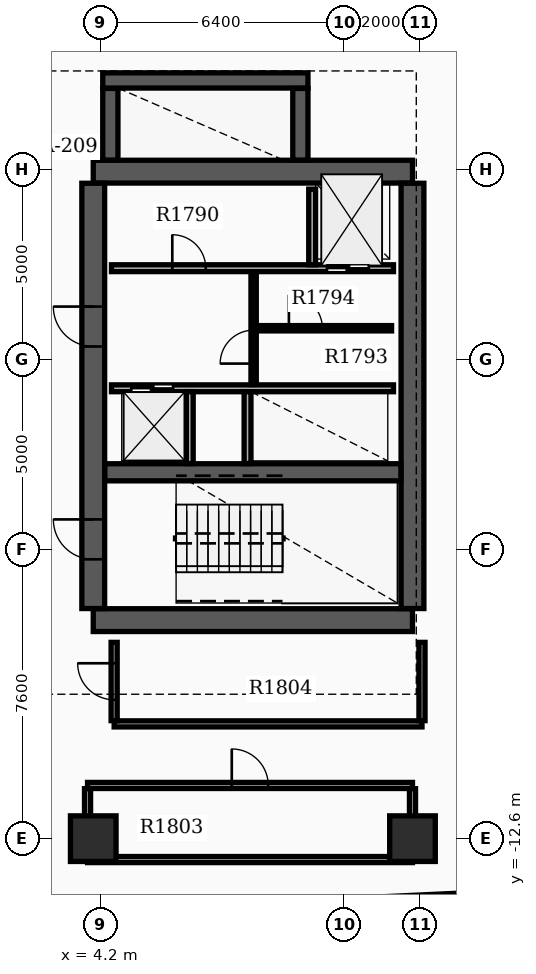
"""IFC4 building model, lengths in metres.
Left out: names, types, materials, properties, quantities, classifications, styles, units other than length and angle.
Written with IfcOpenShell. Run it as: python <this file> out.ifc"""

import sys

from ifc_helpers import new_model, si_unit, direction, frame, frame_2d, origin, origin_2d, place, context, subcontext, project, spatial, rectangle, extrude, element, fill, save


model = new_model("IFC4")
c1 = context("Model", 3, precision=1e-05, world=origin(), true_north=direction((0.0, 1.0)))
c2 = subcontext(c1, "Body", "Model", "MODEL_VIEW")
j1 = project(units=[si_unit("LENGTHUNIT", "METRE"), si_unit("PLANEANGLEUNIT", "RADIAN")], contexts=[c1])
p1 = place(None, origin())
s1 = spatial("IfcSite", under=j1, at=p1, CompositionType="ELEMENT")
p2 = place(p1, origin())
s2 = spatial("IfcBuilding", under=s1, at=p2, CompositionType="ELEMENT")
p3 = place(p2, frame((0.0, 0.0, 116.4)))
s3 = spatial("IfcBuildingStorey", under=s2, at=p3, CompositionType="ELEMENT", Elevation=116.4)
for number, where, z_axis, x_axis in (
    (1, (4.0, -6.85, 0.0), (0.0, 0.0, 1.0), (1.0, 0.0, 0.0)),
    (2, (4.0, 4.95, 0.0), (0.0, 0.0, 1.0), (1.0, 0.0, 0.0)),
):
    element("IfcWall", number, at=place(p3, frame(where, z_axis=z_axis, x_axis=x_axis)), inside=s3, PredefinedType="SHEAR", context=c2, shape_type="SweptSolid", body=[
        extrude(rectangle(XDim=8.4, YDim=0.6, at=frame_2d((4.2, 0.0))), origin(), (0.0, 0.0, 1.0), 3.7),
    ])
p4 = place(p3, frame((4.0, -6.545, 0.0), z_axis=(0.0, 0.0, 1.0), x_axis=(0.0, 1.0, 0.0)))
e3 = element("IfcWall", 3, at=p4, inside=s3, PredefinedType="SHEAR", context=c2, shape_type="SweptSolid", body=[
    extrude(rectangle(XDim=11.19, YDim=0.6, at=frame_2d((5.595, 0.0))), origin(), (0.0, 0.0, 1.0), 3.7),
])
p5 = place(p4, frame((1.295, 0.0, 0.0)))
e4 = element("IfcOpeningElement", 4, at=p5, cuts=e3, PredefinedType="OPENING", context=c2, shape_type="SweptSolid", body=[
    extrude(rectangle(XDim=1.05, YDim=2.15, at=frame_2d((0.525, 1.075))), frame((0.0, 0.31, 0.0), z_axis=(0.0, -1.0, 0.0), x_axis=(1.0, 0.0, 0.0)), (0.0, 0.0, 1.0), 0.62),
])
p6 = place(p4, frame((6.895, 0.0, 0.0)))
e5 = element("IfcOpeningElement", 5, at=p6, cuts=e3, PredefinedType="OPENING", context=c2, shape_type="SweptSolid", body=[
    extrude(rectangle(XDim=1.05, YDim=2.15, at=frame_2d((0.525, 1.075))), frame((0.0, 0.31, 0.0), z_axis=(0.0, -1.0, 0.0), x_axis=(1.0, 0.0, 0.0)), (0.0, 0.0, 1.0), 0.62),
])
p7 = place(p3, frame((12.4, -6.545, 0.0), z_axis=(0.0, 0.0, 1.0), x_axis=(0.0, 1.0, 0.0)))
e6 = element("IfcWall", 6, at=p7, inside=s3, PredefinedType="SHEAR", context=c2, shape_type="SweptSolid", body=[
    extrude(rectangle(XDim=11.19, YDim=0.6, at=frame_2d((5.595, 0.0))), origin(), (0.0, 0.0, 1.0), 3.7),
])
p8 = place(p3, frame((4.305, -2.96, 0.0), z_axis=(0.0, 0.0, 1.0), x_axis=(1.0, 0.0, 0.0)))
e7 = element("IfcWall", 7, at=p8, inside=s3, PredefinedType="SHEAR", context=c2, shape_type="SweptSolid", body=[
    extrude(rectangle(XDim=7.79, YDim=0.45, at=frame_2d((3.895, 0.0))), origin(), (0.0, 0.0, 1.0), 3.7),
])
p9 = place(p3, frame((4.45, 5.255, 0.0), z_axis=(0.0, 0.0, 1.0), x_axis=(0.0, 1.0, 0.0)))
e8 = element("IfcWall", 8, at=p9, inside=s3, PredefinedType="SHEAR", context=c2, shape_type="SweptSolid", body=[
    extrude(rectangle(XDim=1.885, YDim=0.4, at=frame_2d((0.942, 0.0))), origin(), (0.0, 0.0, 1.0), 3.7),
])
p10 = place(p3, frame((4.25, 7.35, 0.0), z_axis=(0.0, 0.0, 1.0), x_axis=(1.0, 0.0, 0.0)))
e9 = element("IfcWall", 9, at=p10, inside=s3, PredefinedType="SHEAR", context=c2, shape_type="SweptSolid", body=[
    extrude(rectangle(XDim=5.4, YDim=0.4, at=frame_2d((2.7, 0.0))), origin(), (0.0, 0.0, 1.0), 3.7),
])
p11 = place(p3, frame((9.45, 5.255, 0.0), z_axis=(0.0, 0.0, 1.0), x_axis=(0.0, 1.0, 0.0)))
e10 = element("IfcWall", 10, at=p11, inside=s3, PredefinedType="SHEAR", context=c2, shape_type="SweptSolid", body=[
    extrude(rectangle(XDim=1.885, YDim=0.4, at=frame_2d((0.942, 0.0))), origin(), (0.0, 0.0, 1.0), 3.7),
])
for number, where, z_axis, x_axis in (
    (11, (12.4, -12.6, 0.0), (0.0, 0.0, 1.0), (1.0, 0.0, 0.0)),
    (12, (4.0, -12.6, 0.0), (0.0, 0.0, 1.0), (1.0, 0.0, 0.0)),
):
    element("IfcColumn", number, at=place(p3, frame(where, z_axis=z_axis, x_axis=x_axis)), inside=s3, PredefinedType="COLUMN", context=c2, shape_type="SweptSolid", body=[
        extrude(rectangle(XDim=1.2, YDim=1.2, at=origin_2d()), origin(), (0.0, 0.0, 1.0), 3.9),
    ])
p12 = place(p3, frame((13.843, -14.164, 0.0), z_axis=(0.0, 0.0, 1.0), x_axis=(-0.998889082162, -0.047123258997, 0.0)))
e13 = element("IfcWall", 13, at=p12, inside=s3, PredefinedType="STANDARD", context=c2, shape_type="SweptSolid", body=[
    extrude(rectangle(XDim=6.3, YDim=0.28, at=frame_2d((3.15, 0.0))), origin(), (0.0, 0.0, 1.0), 2.97),
])
p13 = place(p3, frame((4.48, 2.41, 0.0), z_axis=(0.0, 0.0, 1.0), x_axis=(1.0, 0.0, 0.0)))
e14 = element("IfcWall", 14, at=p13, inside=s3, PredefinedType="SOLIDWALL", context=c2, shape_type="SweptSolid", body=[
    extrude(rectangle(XDim=7.42, YDim=0.18, at=frame_2d((3.71, 0.0))), origin(), (0.0, 0.0, 1.0), 2.96),
])
p14 = place(p13, frame((5.67, 0.0, 0.0)))
e15 = element("IfcOpeningElement", 15, at=p14, cuts=e14, PredefinedType="OPENING", context=c2, shape_type="SweptSolid", body=[
    extrude(rectangle(XDim=1.1, YDim=2.15, at=frame_2d((0.55, 1.075))), frame((0.0, 0.1, 0.0), z_axis=(0.0, -1.0, 0.0), x_axis=(1.0, 0.0, 0.0)), (0.0, 0.0, 1.0), 0.2),
])
p15 = place(p13, frame((1.6, 0.0, 0.0)))
e16 = element("IfcOpeningElement", 16, at=p15, cuts=e14, PredefinedType="OPENING", context=c2, shape_type="SweptSolid", body=[
    extrude(rectangle(XDim=0.88, YDim=2.1, at=frame_2d((0.44, 1.05))), frame((0.0, 0.1, 0.0), z_axis=(0.0, -1.0, 0.0), x_axis=(1.0, 0.0, 0.0)), (0.0, 0.0, 1.0), 0.2),
])
p16 = place(p3, frame((4.48, -0.75, 0.0), z_axis=(0.0, 0.0, 1.0), x_axis=(1.0, 0.0, 0.0)))
e17 = element("IfcWall", 17, at=p16, inside=s3, PredefinedType="SOLIDWALL", context=c2, shape_type="SweptSolid", body=[
    extrude(rectangle(XDim=7.42, YDim=0.18, at=frame_2d((3.71, 0.0))), origin(), (0.0, 0.0, 1.0), 2.96),
])
p17 = place(p16, frame((0.52, 0.0, 0.0)))
e18 = element("IfcOpeningElement", 18, at=p17, cuts=e17, PredefinedType="OPENING", context=c2, shape_type="SweptSolid", body=[
    extrude(rectangle(XDim=1.1, YDim=2.15, at=frame_2d((0.55, 1.075))), frame((0.0, 0.1, 0.0), z_axis=(0.0, -1.0, 0.0), x_axis=(1.0, 0.0, 0.0)), (0.0, 0.0, 1.0), 0.2),
])
p18 = place(p3, frame((9.76, 2.5, 0.0), z_axis=(0.0, 0.0, 1.0), x_axis=(0.0, 1.0, 0.0)))
e19 = element("IfcWall", 19, at=p18, inside=s3, PredefinedType="SOLIDWALL", context=c2, shape_type="SweptSolid", body=[
    extrude(rectangle(XDim=1.99, YDim=0.18, at=frame_2d((0.995, 0.0))), origin(), (0.0, 0.0, 1.0), 2.96),
])
for number, where, z_axis, x_axis in (
    (20, (6.54, -2.73, 0.0), (0.0, 0.0, 1.0), (0.0, 1.0, 0.0)),
    (21, (8.06, -2.73, 0.0), (0.0, 0.0, 1.0), (0.0, 1.0, 0.0)),
):
    element("IfcWall", number, at=place(p3, frame(where, z_axis=z_axis, x_axis=x_axis)), inside=s3, PredefinedType="SOLIDWALL", context=c2, shape_type="SweptSolid", body=[
        extrude(rectangle(XDim=1.89, YDim=0.18, at=frame_2d((0.945, 0.0))), origin(), (0.0, 0.0, 1.0), 2.96),
    ])
p19 = place(p3, frame((8.22, -0.65, 0.0), z_axis=(0.0, 0.0, 1.0), x_axis=(0.0, 1.0, 0.0)))
e22 = element("IfcWall", 22, at=p19, inside=s3, PredefinedType="SOLIDWALL", context=c2, shape_type="SweptSolid", body=[
    extrude(rectangle(XDim=2.96, YDim=0.14, at=frame_2d((1.48, 0.0))), origin(), (0.0, 0.0, 1.0), 2.96),
])
p20 = place(p19, frame((0.55, 0.0, 0.0)))
e23 = element("IfcOpeningElement", 23, at=p20, cuts=e22, PredefinedType="OPENING", context=c2, shape_type="SweptSolid", body=[
    extrude(rectangle(XDim=0.88, YDim=2.1, at=frame_2d((0.44, 1.05))), frame((0.0, 0.08, 0.0), z_axis=(0.0, -1.0, 0.0), x_axis=(1.0, 0.0, 0.0)), (0.0, 0.0, 1.0), 0.16),
])
p21 = place(p3, frame((8.298, 0.83, 0.0), z_axis=(0.0, 0.0, 1.0), x_axis=(1.0, 0.0, 0.0)))
e24 = element("IfcWall", 24, at=p21, inside=s3, PredefinedType="PARTITIONING", context=c2, shape_type="SweptSolid", body=[
    extrude(rectangle(XDim=3.552, YDim=0.14, at=frame_2d((1.776, 0.0))), origin(), (0.0, 0.0, 1.0), 2.96),
])
p22 = place(p21, frame((0.85, 0.0, 0.0)))
e25 = element("IfcOpeningElement", 25, at=p22, cuts=e24, PredefinedType="OPENING", context=c2, shape_type="SweptSolid", body=[
    extrude(rectangle(XDim=0.88, YDim=2.1, at=frame_2d((0.44, 1.05))), frame((0.0, 0.08, 0.0), z_axis=(0.0, -1.0, 0.0), x_axis=(1.0, 0.0, 0.0)), (0.0, 0.0, 1.0), 0.16),
])
p23 = place(p3, frame((3.85, -13.15, 0.0), z_axis=(0.0, 0.0, 1.0), x_axis=(1.0, 0.0, 0.0)))
e26 = element("IfcWall", 26, at=p23, inside=s3, PredefinedType="PARTITIONING", context=c2, shape_type="SweptSolid", body=[
    extrude(rectangle(XDim=8.55, YDim=0.16, at=frame_2d((4.275, 0.0))), origin(), (0.0, 0.0, 1.0), 2.96),
])
p24 = place(p3, frame((3.85, -11.2, 0.0), z_axis=(0.0, 0.0, 1.0), x_axis=(1.0, 0.0, 0.0)))
e27 = element("IfcWall", 27, at=p24, inside=s3, PredefinedType="PARTITIONING", context=c2, shape_type="SweptSolid", body=[
    extrude(rectangle(XDim=8.55, YDim=0.16, at=frame_2d((4.275, 0.0))), origin(), (0.0, 0.0, 1.0), 2.96),
])
p25 = place(p24, frame((3.795, 0.0, 0.0)))
e28 = element("IfcOpeningElement", 28, at=p25, cuts=e27, PredefinedType="OPENING", context=c2, shape_type="SweptSolid", body=[
    extrude(rectangle(XDim=0.96, YDim=2.15, at=frame_2d((0.48, 1.075))), frame((0.0, 0.09, 0.0), z_axis=(0.0, -1.0, 0.0), x_axis=(1.0, 0.0, 0.0)), (0.0, 0.0, 1.0), 0.18),
])
for number, where, z_axis, x_axis in (
    (29, (3.85, -13.065, 0.0), (0.0, 0.0, 1.0), (0.0, 1.0, 0.0)),
    (30, (12.4, -13.065, 0.0), (0.0, 0.0, 1.0), (0.0, 1.0, 0.0)),
):
    element("IfcWall", number, at=place(p3, frame(where, z_axis=z_axis, x_axis=x_axis)), inside=s3, PredefinedType="PARTITIONING", context=c2, shape_type="SweptSolid", body=[
        extrude(rectangle(XDim=1.78, YDim=0.16, at=frame_2d((0.89, 0.0))), origin(), (0.0, 0.0, 1.0), 2.96),
    ])
p26 = place(p3, frame((4.55, -9.58, 0.0), z_axis=(0.0, 0.0, 1.0), x_axis=(1.0, 0.0, 0.0)))
e31 = element("IfcWall", 31, at=p26, inside=s3, PredefinedType="PARTITIONING", context=c2, shape_type="SweptSolid", body=[
    extrude(rectangle(XDim=8.1, YDim=0.16, at=frame_2d((4.05, 0.0))), origin(), (0.0, 0.0, 1.0), 2.96),
])
p27 = place(p3, frame((4.55, -9.495, 0.0), z_axis=(0.0, 0.0, 1.0), x_axis=(0.0, 1.0, 0.0)))
e32 = element("IfcWall", 32, at=p27, inside=s3, PredefinedType="PARTITIONING", context=c2, shape_type="SweptSolid", body=[
    extrude(rectangle(XDim=2.06, YDim=0.16, at=frame_2d((1.03, 0.0))), origin(), (0.0, 0.0, 1.0), 2.96),
])
p28 = place(p27, frame((0.55, 0.0, 0.0)))
e33 = element("IfcOpeningElement", 33, at=p28, cuts=e32, PredefinedType="OPENING", context=c2, shape_type="SweptSolid", body=[
    extrude(rectangle(XDim=0.96, YDim=2.15, at=frame_2d((0.48, 1.075))), frame((0.0, 0.09, 0.0), z_axis=(0.0, -1.0, 0.0), x_axis=(1.0, 0.0, 0.0)), (0.0, 0.0, 1.0), 0.18),
])
p29 = place(p3, frame((12.65, -9.495, 0.0), z_axis=(0.0, 0.0, 1.0), x_axis=(0.0, 1.0, 0.0)))
e34 = element("IfcWall", 34, at=p29, inside=s3, PredefinedType="PARTITIONING", context=c2, shape_type="SweptSolid", body=[
    extrude(rectangle(XDim=2.06, YDim=0.16, at=frame_2d((1.03, 0.0))), origin(), (0.0, 0.0, 1.0), 2.96),
])
p30 = place(p5, origin())
e35 = element("IfcDoor", 35, at=p30, inside=s3, OperationType="SINGLE_SWING_RIGHT", PredefinedType="DOOR", context=c2, shape_type="SweptSolid", body=[
    extrude(rectangle(XDim=1.05, YDim=2.15, at=frame_2d((0.525, 1.075))), frame((0.0, 0.025, 0.0), z_axis=(0.0, -1.0, 0.0), x_axis=(1.0, 0.0, 0.0)), (0.0, 0.0, 1.0), 0.05),
])
fill(e4, e35)
p31 = place(p6, origin())
e36 = element("IfcDoor", 36, at=p31, inside=s3, OperationType="SINGLE_SWING_RIGHT", PredefinedType="DOOR", context=c2, shape_type="SweptSolid", body=[
    extrude(rectangle(XDim=1.05, YDim=2.15, at=frame_2d((0.525, 1.075))), frame((0.0, 0.025, 0.0), z_axis=(0.0, -1.0, 0.0), x_axis=(1.0, 0.0, 0.0)), (0.0, 0.0, 1.0), 0.05),
])
fill(e5, e36)
p32 = place(p14, origin())
e37 = element("IfcDoor", 37, at=p32, inside=s3, OperationType="DOUBLE_DOOR_SLIDING", PredefinedType="DOOR", context=c2, shape_type="SweptSolid", body=[
    extrude(rectangle(XDim=1.1, YDim=2.15, at=frame_2d((0.55, 1.075))), frame((0.0, 0.025, 0.0), z_axis=(0.0, -1.0, 0.0), x_axis=(1.0, 0.0, 0.0)), (0.0, 0.0, 1.0), 0.05),
])
fill(e15, e37)
p33 = place(p17, origin())
e38 = element("IfcDoor", 38, at=p33, inside=s3, OperationType="DOUBLE_DOOR_SLIDING", PredefinedType="DOOR", context=c2, shape_type="SweptSolid", body=[
    extrude(rectangle(XDim=1.1, YDim=2.15, at=frame_2d((0.55, 1.075))), frame((0.0, 0.025, 0.0), z_axis=(0.0, -1.0, 0.0), x_axis=(1.0, 0.0, 0.0)), (0.0, 0.0, 1.0), 0.05),
])
fill(e18, e38)
p34 = place(p15, origin())
e39 = element("IfcDoor", 39, at=p34, inside=s3, OperationType="SINGLE_SWING_LEFT", PredefinedType="DOOR", context=c2, shape_type="SweptSolid", body=[
    extrude(rectangle(XDim=0.88, YDim=2.1, at=frame_2d((0.44, 1.05))), frame((0.0, 0.025, 0.0), z_axis=(0.0, -1.0, 0.0), x_axis=(1.0, 0.0, 0.0)), (0.0, 0.0, 1.0), 0.05),
])
fill(e16, e39)
p35 = place(p20, origin())
e40 = element("IfcDoor", 40, at=p35, inside=s3, OperationType="SINGLE_SWING_LEFT", PredefinedType="DOOR", context=c2, shape_type="SweptSolid", body=[
    extrude(rectangle(XDim=0.88, YDim=2.1, at=frame_2d((0.44, 1.05))), frame((0.0, 0.025, 0.0), z_axis=(0.0, -1.0, 0.0), x_axis=(1.0, 0.0, 0.0)), (0.0, 0.0, 1.0), 0.05),
])
fill(e23, e40)
p36 = place(p22, origin())
e41 = element("IfcDoor", 41, at=p36, inside=s3, OperationType="SINGLE_SWING_LEFT", PredefinedType="DOOR", context=c2, shape_type="SweptSolid", body=[
    extrude(rectangle(XDim=0.88, YDim=2.1, at=frame_2d((0.44, 1.05))), frame((0.0, 0.025, 0.0), z_axis=(0.0, -1.0, 0.0), x_axis=(1.0, 0.0, 0.0)), (0.0, 0.0, 1.0), 0.05),
])
fill(e25, e41)
p37 = place(p25, origin())
e42 = element("IfcDoor", 42, at=p37, inside=s3, OperationType="SINGLE_SWING_LEFT", PredefinedType="DOOR", context=c2, shape_type="SweptSolid", body=[
    extrude(rectangle(XDim=0.96, YDim=2.15, at=frame_2d((0.48, 1.075))), frame((0.0, 0.025, 0.0), z_axis=(0.0, -1.0, 0.0), x_axis=(1.0, 0.0, 0.0)), (0.0, 0.0, 1.0), 0.05),
])
fill(e28, e42)
p38 = place(p28, origin())
e43 = element("IfcDoor", 43, at=p38, inside=s3, OperationType="SINGLE_SWING_RIGHT", PredefinedType="DOOR", context=c2, shape_type="SweptSolid", body=[
    extrude(rectangle(XDim=0.96, YDim=2.15, at=frame_2d((0.48, 1.075))), frame((0.0, 0.025, 0.0), z_axis=(0.0, -1.0, 0.0), x_axis=(1.0, 0.0, 0.0)), (0.0, 0.0, 1.0), 0.05),
])
fill(e33, e43)
save(model, sys.argv[1])
